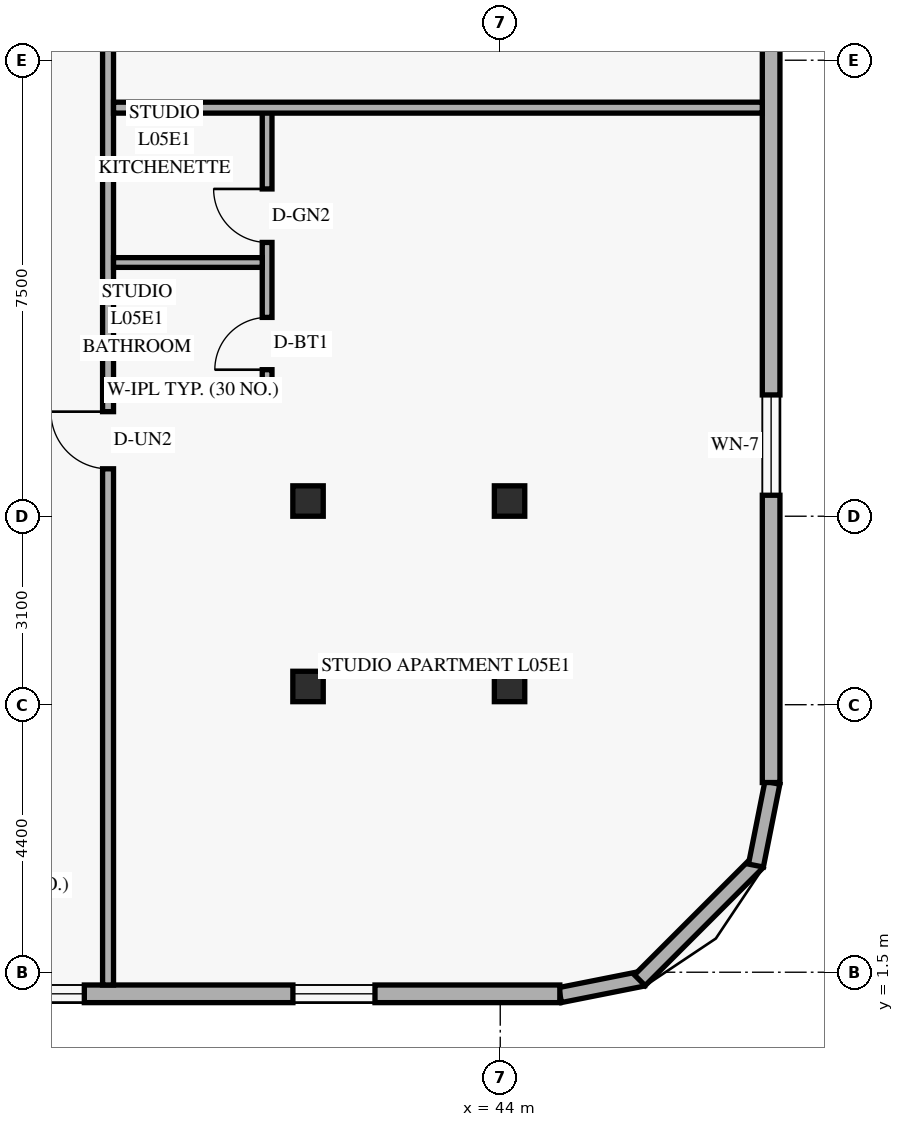
"""IFC4 building model, lengths in metres.
Left out: names, types, materials, properties, quantities, classifications, styles, units other than length and angle.
Written with IfcOpenShell. Run it as: python <this file> out.ifc"""

import sys

from ifc_helpers import new_model, si_unit, direction, frame, frame_2d, origin, origin_2d, place, context, subcontext, project, spatial, rectangle, hollow_rectangle, extrude, element, fill, save


model = new_model("IFC4")
c1 = context("Model", 3, precision=1e-05, world=origin(), true_north=direction((0.0, 1.0)))
c2 = subcontext(c1, "Body", "Model", "MODEL_VIEW")
j1 = project(units=[si_unit("LENGTHUNIT", "METRE"), si_unit("PLANEANGLEUNIT", "RADIAN")], contexts=[c1])
p1 = place(None, origin())
s1 = spatial("IfcSite", under=j1, at=p1, CompositionType="ELEMENT")
p2 = place(p1, origin())
s2 = spatial("IfcBuilding", under=s1, at=p2, CompositionType="ELEMENT")
p3 = place(p2, frame((0.0, 0.0, 24.0)))
s3 = spatial("IfcBuildingStorey", under=s2, at=p3, CompositionType="ELEMENT", Elevation=24.0)
for number, where, z_axis, x_axis in (
    (1, (40.776, 6.2, 0.0), (0.035, 0.0, 0.999), (0.0, 1.0, 0.0)),
    (2, (40.776, 9.25, 0.0), (0.035, 0.0, 0.999), (0.0, 1.0, 0.0)),
):
    element("IfcColumn", number, at=place(p3, frame(where, z_axis=z_axis, x_axis=x_axis)), inside=s3, PredefinedType="COLUMN", context=c2, shape_type="SweptSolid", body=[
        extrude(hollow_rectangle(XDim=0.5, YDim=0.5, WallThickness=0.022, at=origin_2d()), origin(), (0.0, 0.0, 1.0), 3.602),
    ])
for number, where, z_axis, x_axis in (
    (3, (44.049, 6.2, 0.0), (0.058, 0.0, 0.998), (0.0, 1.0, 0.0)),
    (4, (44.049, 9.25, 0.0), (0.058, 0.0, 0.998), (0.0, 1.0, 0.0)),
):
    element("IfcColumn", number, at=place(p3, frame(where, z_axis=z_axis, x_axis=x_axis)), inside=s3, PredefinedType="COLUMN", context=c2, shape_type="SweptSolid", body=[
        extrude(hollow_rectangle(XDim=0.5, YDim=0.5, WallThickness=0.022, at=origin_2d()), origin(), (0.0, 0.0, 1.0), 3.606),
    ])
p4 = place(p3, frame((44.983, 1.124, 0.0), z_axis=(0.0, 0.0, 1.0), x_axis=(0.980809899341, 0.19496651342, 0.0)))
e5 = element("IfcWall", 5, at=p4, inside=s3, PredefinedType="SOLIDWALL", context=c2, shape_type="SweptSolid", body=[
    extrude(rectangle(XDim=1.389, YDim=0.25, at=frame_2d((0.694, 0.0))), origin(), (0.0, 0.0, 1.0), 3.36),
])
p5 = place(p3, frame((46.295, 1.368, 0.0), z_axis=(0.0, 0.0, 1.0), x_axis=(0.707106781187, 0.707106781187, 0.0)))
e6 = element("IfcWall", 6, at=p5, inside=s3, PredefinedType="SOLIDWALL", context=c2, shape_type="SweptSolid", body=[
    extrude(rectangle(XDim=2.739, YDim=0.25, at=frame_2d((1.37, 0.0))), origin(), (0.0, 0.0, 1.0), 3.36),
])
p6 = place(p3, frame((48.205, 3.254, 0.0), z_axis=(0.0, 0.0, 1.0), x_axis=(0.19496651342, 0.980809899341, 0.0)))
e7 = element("IfcWall", 7, at=p6, inside=s3, PredefinedType="SOLIDWALL", context=c2, shape_type="SweptSolid", body=[
    extrude(rectangle(XDim=1.389, YDim=0.25, at=frame_2d((0.694, 0.0))), origin(), (0.0, 0.0, 1.0), 3.36),
])
p7 = place(p3, frame((5.42, 1.145, 0.0), z_axis=(0.0, 0.0, 1.0), x_axis=(1.0, 0.0, 0.0)))
e8 = element("IfcWall", 8, at=p7, inside=s3, PredefinedType="SOLIDWALL", context=c2, shape_type="SweptSolid", body=[
    extrude(rectangle(XDim=39.56, YDim=0.29, at=frame_2d((19.78, 0.0))), origin(), (0.0, 0.0, 1.0), 3.36),
])
p8 = place(p7, frame((2.765, 0.0, 0.85)))
e9 = element("IfcOpeningElement", 9, at=p8, cuts=e8, PredefinedType="OPENING", context=c2, shape_type="SweptSolid", body=[
    extrude(rectangle(XDim=1.35, YDim=1.55, at=frame_2d((0.675, 0.775))), frame((0.0, 0.155, 0.0), z_axis=(0.0, -1.0, 0.0), x_axis=(1.0, 0.0, 0.0)), (0.0, 0.0, 1.0), 0.31),
])
p9 = place(p7, frame((7.18, 0.0, 0.85)))
e10 = element("IfcOpeningElement", 10, at=p9, cuts=e8, PredefinedType="OPENING", context=c2, shape_type="SweptSolid", body=[
    extrude(rectangle(XDim=1.2, YDim=1.5, at=frame_2d((0.6, 0.75))), frame((0.0, 0.155, 0.0), z_axis=(0.0, -1.0, 0.0), x_axis=(1.0, 0.0, 0.0)), (0.0, 0.0, 1.0), 0.31),
])
p10 = place(p7, frame((11.17, 0.0, 0.85)))
e11 = element("IfcOpeningElement", 11, at=p10, cuts=e8, PredefinedType="OPENING", context=c2, shape_type="SweptSolid", body=[
    extrude(rectangle(XDim=1.35, YDim=1.55, at=frame_2d((0.675, 0.775))), frame((0.0, 0.155, 0.0), z_axis=(0.0, -1.0, 0.0), x_axis=(1.0, 0.0, 0.0)), (0.0, 0.0, 1.0), 0.31),
])
p11 = place(p7, frame((16.406, 0.0, 0.85)))
e12 = element("IfcOpeningElement", 12, at=p11, cuts=e8, PredefinedType="OPENING", context=c2, shape_type="SweptSolid", body=[
    extrude(rectangle(XDim=1.35, YDim=1.55, at=frame_2d((0.675, 0.775))), frame((0.0, 0.155, 0.0), z_axis=(0.0, -1.0, 0.0), x_axis=(1.0, 0.0, 0.0)), (0.0, 0.0, 1.0), 0.31),
])
p12 = place(p7, frame((21.83, 0.0, 0.85)))
e13 = element("IfcOpeningElement", 13, at=p12, cuts=e8, PredefinedType="OPENING", context=c2, shape_type="SweptSolid", body=[
    extrude(rectangle(XDim=1.35, YDim=1.55, at=frame_2d((0.675, 0.775))), frame((0.0, 0.155, 0.0), z_axis=(0.0, -1.0, 0.0), x_axis=(1.0, 0.0, 0.0)), (0.0, 0.0, 1.0), 0.31),
])
p13 = place(p7, frame((27.255, 0.0, 0.85)))
e14 = element("IfcOpeningElement", 14, at=p13, cuts=e8, PredefinedType="OPENING", context=c2, shape_type="SweptSolid", body=[
    extrude(rectangle(XDim=1.35, YDim=1.55, at=frame_2d((0.675, 0.775))), frame((0.0, 0.155, 0.0), z_axis=(0.0, -1.0, 0.0), x_axis=(1.0, 0.0, 0.0)), (0.0, 0.0, 1.0), 0.31),
])
p14 = place(p7, frame((30.39, 0.0, 0.85)))
e15 = element("IfcOpeningElement", 15, at=p14, cuts=e8, PredefinedType="OPENING", context=c2, shape_type="SweptSolid", body=[
    extrude(rectangle(XDim=1.35, YDim=1.55, at=frame_2d((0.675, 0.775))), frame((0.0, 0.155, 0.0), z_axis=(0.0, -1.0, 0.0), x_axis=(1.0, 0.0, 0.0)), (0.0, 0.0, 1.0), 0.31),
])
p15 = place(p7, frame((35.17, 0.0, 0.85)))
e16 = element("IfcOpeningElement", 16, at=p15, cuts=e8, PredefinedType="OPENING", context=c2, shape_type="SweptSolid", body=[
    extrude(rectangle(XDim=1.35, YDim=1.55, at=frame_2d((0.675, 0.775))), frame((0.0, 0.155, 0.0), z_axis=(0.0, -1.0, 0.0), x_axis=(1.0, 0.0, 0.0)), (0.0, 0.0, 1.0), 0.31),
])
p16 = place(p3, frame((48.455, 4.62, 0.0), z_axis=(0.0, 0.0, 1.0), x_axis=(0.0, 1.0, 0.0)))
e17 = element("IfcWall", 17, at=p16, inside=s3, PredefinedType="SOLIDWALL", context=c2, shape_type="SweptSolid", body=[
    extrude(rectangle(XDim=38.76, YDim=0.29, at=frame_2d((19.38, 0.0))), origin(), (0.0, 0.0, 1.0), 3.36),
])
p17 = place(p16, frame((4.725, 0.0, 0.85)))
e18 = element("IfcOpeningElement", 18, at=p17, cuts=e17, PredefinedType="OPENING", context=c2, shape_type="SweptSolid", body=[
    extrude(rectangle(XDim=1.65, YDim=1.6, at=frame_2d((0.825, 0.8))), frame((0.0, 0.155, 0.0), z_axis=(0.0, -1.0, 0.0), x_axis=(1.0, 0.0, 0.0)), (0.0, 0.0, 1.0), 0.31),
])
p18 = place(p16, frame((12.429, 0.0, 0.85)))
e19 = element("IfcOpeningElement", 19, at=p18, cuts=e17, PredefinedType="OPENING", context=c2, shape_type="SweptSolid", body=[
    extrude(rectangle(XDim=1.65, YDim=1.6, at=frame_2d((0.825, 0.8))), frame((0.0, 0.155, 0.0), z_axis=(0.0, -1.0, 0.0), x_axis=(1.0, 0.0, 0.0)), (0.0, 0.0, 1.0), 0.31),
])
p19 = place(p16, frame((18.254, 0.0, 0.85)))
e20 = element("IfcOpeningElement", 20, at=p19, cuts=e17, PredefinedType="OPENING", context=c2, shape_type="SweptSolid", body=[
    extrude(rectangle(XDim=1.65, YDim=1.6, at=frame_2d((0.825, 0.8))), frame((0.0, 0.155, 0.0), z_axis=(0.0, -1.0, 0.0), x_axis=(1.0, 0.0, 0.0)), (0.0, 0.0, 1.0), 0.31),
])
p20 = place(p16, frame((23.92, 0.0, 0.85)))
e21 = element("IfcOpeningElement", 21, at=p20, cuts=e17, PredefinedType="OPENING", context=c2, shape_type="SweptSolid", body=[
    extrude(rectangle(XDim=1.65, YDim=1.6, at=frame_2d((0.825, 0.8))), frame((0.0, 0.155, 0.0), z_axis=(0.0, -1.0, 0.0), x_axis=(1.0, 0.0, 0.0)), (0.0, 0.0, 1.0), 0.31),
])
p21 = place(p16, frame((31.925, 0.0, 0.85)))
e22 = element("IfcOpeningElement", 22, at=p21, cuts=e17, PredefinedType="OPENING", context=c2, shape_type="SweptSolid", body=[
    extrude(rectangle(XDim=1.65, YDim=1.6, at=frame_2d((0.825, 0.8))), frame((0.0, 0.155, 0.0), z_axis=(0.0, -1.0, 0.0), x_axis=(1.0, 0.0, 0.0)), (0.0, 0.0, 1.0), 0.31),
])
p22 = place(p3, frame((37.55, 1.29, 0.0), z_axis=(0.0, 0.0, 1.0), x_axis=(0.0, 1.0, 0.0)))
e23 = element("IfcWall", 23, at=p22, inside=s3, PredefinedType="STANDARD", context=c2, shape_type="SweptSolid", body=[
    extrude(rectangle(XDim=45.42, YDim=0.18, at=frame_2d((22.71, 0.0))), origin(), (0.0, 0.0, 1.0), 2.649),
])
p23 = place(p22, frame((8.49, 0.0, 0.0)))
e24 = element("IfcOpeningElement", 24, at=p23, cuts=e23, PredefinedType="OPENING", context=c2, shape_type="SweptSolid", body=[
    extrude(rectangle(XDim=0.94, YDim=2.15, at=frame_2d((0.47, 1.075))), frame((0.0, 0.1, 0.0), z_axis=(0.0, -1.0, 0.0), x_axis=(1.0, 0.0, 0.0)), (0.0, 0.0, 1.0), 0.2),
])
p24 = place(p22, frame((20.073, 0.0, 0.0)))
e25 = element("IfcOpeningElement", 25, at=p24, cuts=e23, PredefinedType="OPENING", context=c2, shape_type="SweptSolid", body=[
    extrude(rectangle(XDim=0.94, YDim=2.15, at=frame_2d((0.47, 1.075))), frame((0.0, 0.1, 0.0), z_axis=(0.0, -1.0, 0.0), x_axis=(1.0, 0.0, 0.0)), (0.0, 0.0, 1.0), 0.2),
])
p25 = place(p22, frame((35.256, 0.0, 0.0)))
e26 = element("IfcOpeningElement", 26, at=p25, cuts=e23, PredefinedType="OPENING", context=c2, shape_type="SweptSolid", body=[
    extrude(rectangle(XDim=0.94, YDim=2.15, at=frame_2d((0.47, 1.075))), frame((0.0, 0.1, 0.0), z_axis=(0.0, -1.0, 0.0), x_axis=(1.0, 0.0, 0.0)), (0.0, 0.0, 1.0), 0.2),
])
p26 = place(p3, frame((37.64, 11.08, 0.0), z_axis=(0.0, 0.0, 1.0), x_axis=(1.0, 0.0, 0.0)))
e27 = element("IfcWall", 27, at=p26, inside=s3, PredefinedType="PLUMBINGWALL", context=c2, shape_type="SweptSolid", body=[
    extrude(rectangle(XDim=2.606, YDim=0.16, at=frame_2d((1.303, 0.0))), origin(), (0.0, 0.0, 1.0), 3.36),
])
p27 = place(p3, frame((40.166, 10.99, 0.0), z_axis=(0.0, 0.0, 1.0), x_axis=(0.0, 1.0, 0.0)))
e28 = element("IfcWall", 28, at=p27, inside=s3, PredefinedType="PLUMBINGWALL", context=c2, shape_type="SweptSolid", body=[
    extrude(rectangle(XDim=4.73, YDim=0.16, at=frame_2d((2.365, 0.0))), origin(), (0.0, 0.0, 1.0), 2.932),
])
p28 = place(p27, frame((0.42, 0.0, 0.0)))
e29 = element("IfcOpeningElement", 29, at=p28, cuts=e28, PredefinedType="OPENING", context=c2, shape_type="SweptSolid", body=[
    extrude(rectangle(XDim=0.86, YDim=2.12, at=frame_2d((0.43, 1.06))), frame((0.0, 0.09, 0.0), z_axis=(0.0, -1.0, 0.0), x_axis=(1.0, 0.0, 0.0)), (0.0, 0.0, 1.0), 0.18),
])
p29 = place(p27, frame((2.513, 0.0, 0.0)))
e30 = element("IfcOpeningElement", 30, at=p29, cuts=e28, PredefinedType="OPENING", context=c2, shape_type="SweptSolid", body=[
    extrude(rectangle(XDim=0.88, YDim=2.12, at=frame_2d((0.44, 1.06))), frame((0.0, 0.09, 0.0), z_axis=(0.0, -1.0, 0.0), x_axis=(1.0, 0.0, 0.0)), (0.0, 0.0, 1.0), 0.18),
])
p30 = place(p3, frame((37.64, 13.173, 0.0), z_axis=(0.0, 0.0, 1.0), x_axis=(1.0, 0.0, 0.0)))
e31 = element("IfcWall", 31, at=p30, inside=s3, PredefinedType="PLUMBINGWALL", context=c2, shape_type="SweptSolid", body=[
    extrude(rectangle(XDim=2.446, YDim=0.16, at=frame_2d((1.223, 0.0))), origin(), (0.0, 0.0, 1.0), 3.36),
])
p31 = place(p3, frame((37.64, 15.72, 0.0), z_axis=(0.0, 0.0, 1.0), x_axis=(1.0, 0.0, 0.0)))
e32 = element("IfcWall", 32, at=p31, inside=s3, PredefinedType="PARTITIONING", context=c2, shape_type="SweptSolid", body=[
    extrude(rectangle(XDim=10.67, YDim=0.18, at=frame_2d((5.335, 0.0))), origin(), (0.0, 0.0, 1.0), 2.649),
])
p32 = place(p14, origin())
e33 = element("IfcWindow", 33, at=p32, inside=s3, PartitioningType="SINGLE_PANEL", PredefinedType="WINDOW", context=c2, shape_type="SweptSolid", body=[
    extrude(rectangle(XDim=1.35, YDim=1.55, at=frame_2d((0.675, 0.775))), frame((0.0, 0.03, 0.0), z_axis=(0.0, -1.0, 0.0), x_axis=(1.0, 0.0, 0.0)), (0.0, 0.0, 1.0), 0.06),
])
fill(e15, e33)
p33 = place(p15, origin())
e34 = element("IfcWindow", 34, at=p33, inside=s3, PartitioningType="SINGLE_PANEL", PredefinedType="WINDOW", context=c2, shape_type="SweptSolid", body=[
    extrude(rectangle(XDim=1.35, YDim=1.55, at=frame_2d((0.675, 0.775))), frame((0.0, 0.03, 0.0), z_axis=(0.0, -1.0, 0.0), x_axis=(1.0, 0.0, 0.0)), (0.0, 0.0, 1.0), 0.06),
])
fill(e16, e34)
p34 = place(p17, origin())
e35 = element("IfcWindow", 35, at=p34, inside=s3, PartitioningType="SINGLE_PANEL", PredefinedType="WINDOW", context=c2, shape_type="SweptSolid", body=[
    extrude(rectangle(XDim=1.65, YDim=1.6, at=frame_2d((0.825, 0.8))), frame((0.0, 0.03, 0.0), z_axis=(0.0, -1.0, 0.0), x_axis=(1.0, 0.0, 0.0)), (0.0, 0.0, 1.0), 0.06),
])
fill(e18, e35)
p35 = place(p23, origin())
e36 = element("IfcDoor", 36, at=p35, inside=s3, OperationType="SINGLE_SWING_RIGHT", PredefinedType="DOOR", context=c2, shape_type="SweptSolid", body=[
    extrude(rectangle(XDim=0.94, YDim=2.15, at=frame_2d((0.47, 1.075))), frame((0.0, 0.025, 0.0), z_axis=(0.0, -1.0, 0.0), x_axis=(1.0, 0.0, 0.0)), (0.0, 0.0, 1.0), 0.05),
])
fill(e24, e36)
p36 = place(p28, origin())
e37 = element("IfcDoor", 37, at=p36, inside=s3, OperationType="SINGLE_SWING_LEFT", PredefinedType="DOOR", context=c2, shape_type="SweptSolid", body=[
    extrude(rectangle(XDim=0.86, YDim=2.12, at=frame_2d((0.43, 1.06))), frame((0.0, 0.025, 0.0), z_axis=(0.0, -1.0, 0.0), x_axis=(1.0, 0.0, 0.0)), (0.0, 0.0, 1.0), 0.05),
])
fill(e29, e37)
p37 = place(p29, origin())
e38 = element("IfcDoor", 38, at=p37, inside=s3, OperationType="SINGLE_SWING_RIGHT", PredefinedType="DOOR", context=c2, shape_type="SweptSolid", body=[
    extrude(rectangle(XDim=0.88, YDim=2.12, at=frame_2d((0.44, 1.06))), frame((0.0, 0.025, 0.0), z_axis=(0.0, -1.0, 0.0), x_axis=(1.0, 0.0, 0.0)), (0.0, 0.0, 1.0), 0.05),
])
fill(e30, e38)
save(model, sys.argv[1])
